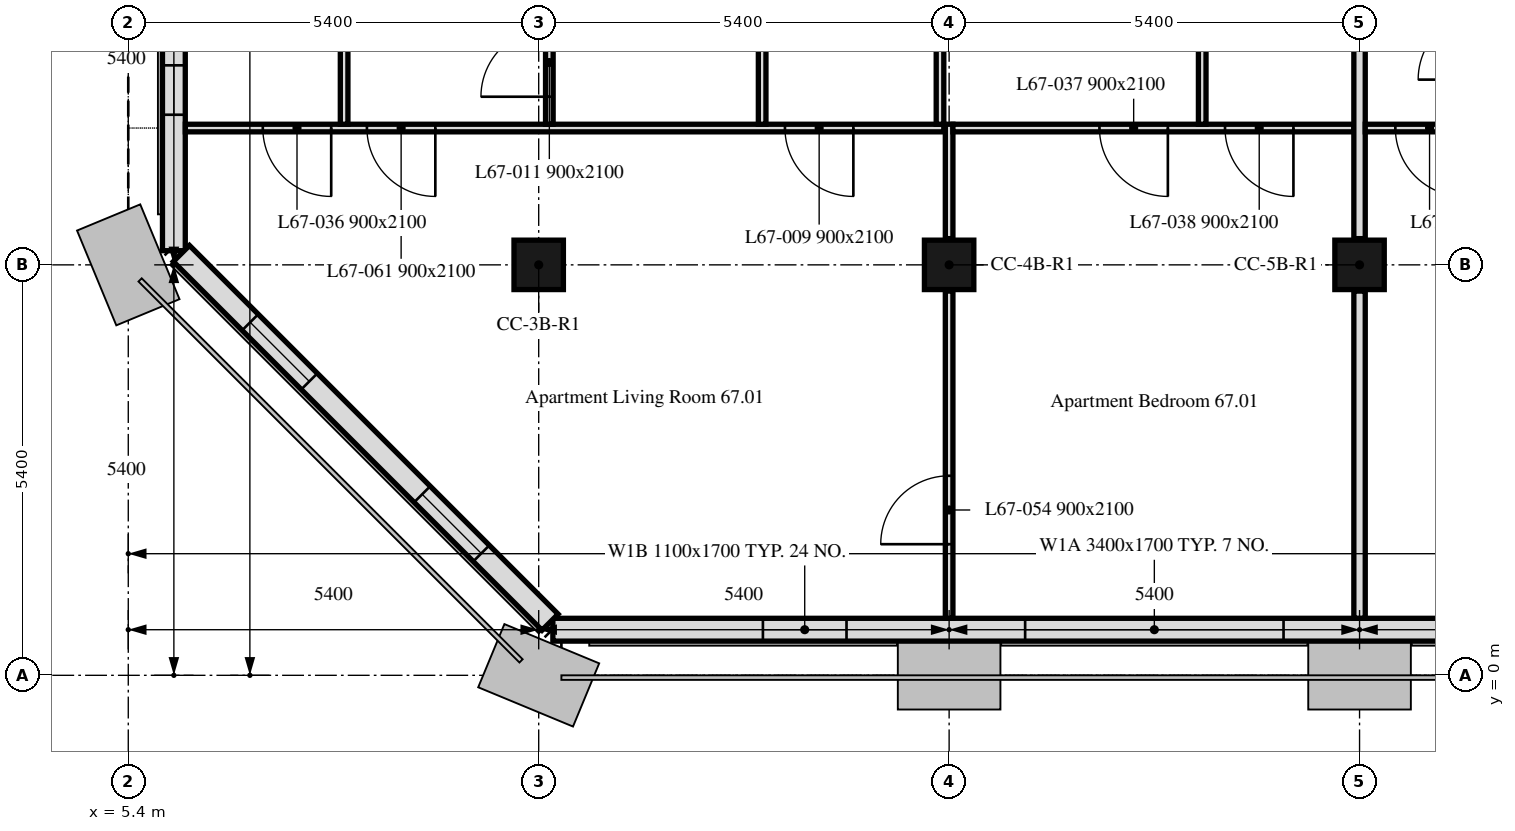
"""IFC4 building model, lengths in metres.
Left out: names, types, materials, properties, quantities, classifications, styles, units other than length and angle.
Written with IfcOpenShell. Run it as: python <this file> out.ifc"""

import sys

from ifc_helpers import new_model, si_unit, direction, frame, frame_2d, origin, origin_2d, place, context, subcontext, project, spatial, rectangle, extrude, element, fill, save


model = new_model("IFC4")
c1 = context("Model", 3, precision=1e-05, world=origin(), true_north=direction((0.0, 1.0)))
c2 = subcontext(c1, "Body", "Model", "MODEL_VIEW")
j1 = project(units=[si_unit("LENGTHUNIT", "METRE"), si_unit("PLANEANGLEUNIT", "RADIAN")], contexts=[c1])
p1 = place(None, origin())
s1 = spatial("IfcSite", under=j1, at=p1, CompositionType="ELEMENT")
p2 = place(p1, origin())
s2 = spatial("IfcBuilding", under=s1, at=p2, CompositionType="ELEMENT")
p3 = place(p2, frame((0.0, 0.0, 275.2)))
s3 = spatial("IfcBuildingStorey", under=s2, at=p3, CompositionType="ELEMENT", Elevation=275.2)
for number, where, z_axis, x_axis in (
    (1, (10.8, 5.4, 0.0), (0.0, 0.0, 1.0), (1.0, 0.0, 0.0)),
    (2, (16.2, 5.4, 0.0), (0.0, 0.0, 1.0), (1.0, 0.0, 0.0)),
    (3, (21.6, 5.4, 0.0), (0.0, 0.0, 1.0), (1.0, 0.0, 0.0)),
):
    element("IfcColumn", number, at=place(p3, frame(where, z_axis=z_axis, x_axis=x_axis)), inside=s3, PredefinedType="COLUMN", context=c2, shape_type="SweptSolid", body=[
        extrude(rectangle(XDim=0.65, YDim=0.65, at=origin_2d()), origin(), (0.0, 0.0, 1.0), 3.0),
    ])
p4 = place(p3, frame((10.986, 0.6, 0.0), z_axis=(0.0, 0.0, 1.0), x_axis=(1.0, 0.0, 0.0)))
e4 = element("IfcWall", 4, at=p4, inside=s3, PredefinedType="SOLIDWALL", context=c2, shape_type="SweptSolid", body=[
    extrude(rectangle(XDim=32.027, YDim=0.3, at=frame_2d((16.014, 0.0))), origin(), (0.0, 0.0, 1.0), 3.0),
])
p5 = place(p4, frame((2.764, 0.0, 0.9)))
e5 = element("IfcOpeningElement", 5, at=p5, cuts=e4, PredefinedType="OPENING", context=c2, shape_type="SweptSolid", body=[
    extrude(rectangle(XDim=1.1, YDim=1.7, at=frame_2d((0.55, 0.85))), frame((0.0, 0.16, 0.0), z_axis=(0.0, -1.0, 0.0), x_axis=(1.0, 0.0, 0.0)), (0.0, 0.0, 1.0), 0.32),
])
p6 = place(p4, frame((6.214, 0.0, 0.9)))
e6 = element("IfcOpeningElement", 6, at=p6, cuts=e4, PredefinedType="OPENING", context=c2, shape_type="SweptSolid", body=[
    extrude(rectangle(XDim=3.4, YDim=1.7, at=frame_2d((1.7, 0.85))), frame((0.0, 0.16, 0.0), z_axis=(0.0, -1.0, 0.0), x_axis=(1.0, 0.0, 0.0)), (0.0, 0.0, 1.0), 0.32),
])
p7 = place(p4, frame((13.564, 0.0, 0.9)))
e7 = element("IfcOpeningElement", 7, at=p7, cuts=e4, PredefinedType="OPENING", context=c2, shape_type="SweptSolid", body=[
    extrude(rectangle(XDim=1.1, YDim=1.7, at=frame_2d((0.55, 0.85))), frame((0.0, 0.16, 0.0), z_axis=(0.0, -1.0, 0.0), x_axis=(1.0, 0.0, 0.0)), (0.0, 0.0, 1.0), 0.32),
])
p8 = place(p4, frame((17.014, 0.0, 0.9)))
e8 = element("IfcOpeningElement", 8, at=p8, cuts=e4, PredefinedType="OPENING", context=c2, shape_type="SweptSolid", body=[
    extrude(rectangle(XDim=3.4, YDim=1.7, at=frame_2d((1.7, 0.85))), frame((0.0, 0.16, 0.0), z_axis=(0.0, -1.0, 0.0), x_axis=(1.0, 0.0, 0.0)), (0.0, 0.0, 1.0), 0.32),
])
p9 = place(p4, frame((24.364, 0.0, 0.9)))
e9 = element("IfcOpeningElement", 9, at=p9, cuts=e4, PredefinedType="OPENING", context=c2, shape_type="SweptSolid", body=[
    extrude(rectangle(XDim=1.1, YDim=1.7, at=frame_2d((0.55, 0.85))), frame((0.0, 0.16, 0.0), z_axis=(0.0, -1.0, 0.0), x_axis=(1.0, 0.0, 0.0)), (0.0, 0.0, 1.0), 0.32),
])
p10 = place(p4, frame((27.814, 0.0, 0.9)))
e10 = element("IfcOpeningElement", 10, at=p10, cuts=e4, PredefinedType="OPENING", context=c2, shape_type="SweptSolid", body=[
    extrude(rectangle(XDim=3.4, YDim=1.7, at=frame_2d((1.7, 0.85))), frame((0.0, 0.16, 0.0), z_axis=(0.0, -1.0, 0.0), x_axis=(1.0, 0.0, 0.0)), (0.0, 0.0, 1.0), 0.32),
])
p11 = place(p3, frame((6.0, 16.2, 0.0), z_axis=(0.0, 0.0, 1.0), x_axis=(0.0, -1.0, 0.0)))
e11 = element("IfcWall", 11, at=p11, inside=s3, PredefinedType="SOLIDWALL", context=c2, shape_type="SweptSolid", body=[
    extrude(rectangle(XDim=10.614, YDim=0.3, at=frame_2d((5.307, 0.0))), origin(), (0.0, 0.0, 1.0), 3.0),
])
p12 = place(p11, frame((1.975, 0.0, 0.9)))
e12 = element("IfcOpeningElement", 12, at=p12, cuts=e11, PredefinedType="OPENING", context=c2, shape_type="SweptSolid", body=[
    extrude(rectangle(XDim=0.65, YDim=1.7, at=frame_2d((0.325, 0.85))), frame((0.0, 0.16, 0.0), z_axis=(0.0, -1.0, 0.0), x_axis=(1.0, 0.0, 0.0)), (0.0, 0.0, 1.0), 0.32),
])
p13 = place(p11, frame((2.95, 0.0, 0.9)))
e13 = element("IfcOpeningElement", 13, at=p13, cuts=e11, PredefinedType="OPENING", context=c2, shape_type="SweptSolid", body=[
    extrude(rectangle(XDim=1.1, YDim=1.7, at=frame_2d((0.55, 0.85))), frame((0.0, 0.16, 0.0), z_axis=(0.0, -1.0, 0.0), x_axis=(1.0, 0.0, 0.0)), (0.0, 0.0, 1.0), 0.32),
])
p14 = place(p11, frame((6.75, 0.0, 0.9)))
e14 = element("IfcOpeningElement", 14, at=p14, cuts=e11, PredefinedType="OPENING", context=c2, shape_type="SweptSolid", body=[
    extrude(rectangle(XDim=1.1, YDim=1.7, at=frame_2d((0.55, 0.85))), frame((0.0, 0.16, 0.0), z_axis=(0.0, -1.0, 0.0), x_axis=(1.0, 0.0, 0.0)), (0.0, 0.0, 1.0), 0.32),
])
p15 = place(p11, frame((8.175, 0.0, 0.9)))
e15 = element("IfcOpeningElement", 15, at=p15, cuts=e11, PredefinedType="OPENING", context=c2, shape_type="SweptSolid", body=[
    extrude(rectangle(XDim=0.65, YDim=1.7, at=frame_2d((0.325, 0.85))), frame((0.0, 0.16, 0.0), z_axis=(0.0, -1.0, 0.0), x_axis=(1.0, 0.0, 0.0)), (0.0, 0.0, 1.0), 0.32),
])
p16 = place(p3, frame((6.099, 5.55, 0.0), z_axis=(0.0, 0.0, 1.0), x_axis=(0.707106781187, -0.707106781187, 0.0)))
e16 = element("IfcWall", 16, at=p16, inside=s3, PredefinedType="SOLIDWALL", context=c2, shape_type="SweptSolid", body=[
    extrude(rectangle(XDim=6.86, YDim=0.3, at=frame_2d((3.43, 0.0))), origin(), (0.0, 0.0, 1.0), 3.0),
])
p17 = place(p16, frame((1.28, 0.0, 0.9)))
e17 = element("IfcOpeningElement", 17, at=p17, cuts=e16, PredefinedType="OPENING", context=c2, shape_type="SweptSolid", body=[
    extrude(rectangle(XDim=1.1, YDim=1.7, at=frame_2d((0.55, 0.85))), frame((0.0, 0.16, 0.0), z_axis=(0.0, -1.0, 0.0), x_axis=(1.0, 0.0, 0.0)), (0.0, 0.0, 1.0), 0.32),
])
p18 = place(p16, frame((4.48, 0.0, 0.9)))
e18 = element("IfcOpeningElement", 18, at=p18, cuts=e16, PredefinedType="OPENING", context=c2, shape_type="SweptSolid", body=[
    extrude(rectangle(XDim=1.1, YDim=1.7, at=frame_2d((0.55, 0.85))), frame((0.0, 0.16, 0.0), z_axis=(0.0, -1.0, 0.0), x_axis=(1.0, 0.0, 0.0)), (0.0, 0.0, 1.0), 0.32),
])
p19 = place(p3, frame((16.2, 0.751, 0.0), z_axis=(0.0, 0.0, 1.0), x_axis=(0.0, 1.0, 0.0)))
e19 = element("IfcWall", 19, at=p19, inside=s3, PredefinedType="PARTITIONING", context=c2, shape_type="SweptSolid", body=[
    extrude(rectangle(XDim=4.304, YDim=0.1, at=frame_2d((2.152, 0.0))), origin(), (0.0, 0.0, 1.0), 2.4),
])
p20 = place(p19, frame((0.974, 0.0, 0.0)))
e20 = element("IfcOpeningElement", 20, at=p20, cuts=e19, PredefinedType="OPENING", context=c2, shape_type="SweptSolid", body=[
    extrude(rectangle(XDim=0.9, YDim=2.1, at=frame_2d((0.45, 1.05))), frame((0.0, 0.05, 0.0), z_axis=(0.0, -1.0, 0.0), x_axis=(1.0, 0.0, 0.0)), (0.0, 0.0, 1.0), 0.1),
])
p21 = place(p3, frame((16.2, 5.745, 0.0), z_axis=(0.0, 0.0, 1.0), x_axis=(0.0, 1.0, 0.0)))
e21 = element("IfcWall", 21, at=p21, inside=s3, PredefinedType="PARTITIONING", context=c2, shape_type="SweptSolid", body=[
    extrude(rectangle(XDim=1.505, YDim=0.1, at=frame_2d((0.752, 0.0))), origin(), (0.0, 0.0, 1.0), 2.4),
])
p22 = place(p3, frame((16.13, 7.2, 0.0), z_axis=(0.0, 0.0, 1.0), x_axis=(-1.0, 0.0, 0.0)))
e22 = element("IfcWall", 22, at=p22, inside=s3, PredefinedType="PARTITIONING", context=c2, shape_type="SweptSolid", body=[
    extrude(rectangle(XDim=9.979, YDim=0.1, at=frame_2d((4.99, 0.0))), origin(), (0.0, 0.0, 1.0), 3.0),
])
p23 = place(p22, frame((1.19, 0.0, 0.0)))
e23 = element("IfcOpeningElement", 23, at=p23, cuts=e22, PredefinedType="OPENING", context=c2, shape_type="SweptSolid", body=[
    extrude(rectangle(XDim=0.9, YDim=2.1, at=frame_2d((0.45, 1.05))), frame((0.0, 0.05, 0.0), z_axis=(0.0, -1.0, 0.0), x_axis=(1.0, 0.0, 0.0)), (0.0, 0.0, 1.0), 0.1),
])
p24 = place(p22, frame((8.06, 0.0, 0.0)))
e24 = element("IfcOpeningElement", 24, at=p24, cuts=e22, PredefinedType="OPENING", context=c2, shape_type="SweptSolid", body=[
    extrude(rectangle(XDim=0.9, YDim=2.1, at=frame_2d((0.45, 1.05))), frame((0.0, 0.05, 0.0), z_axis=(0.0, -1.0, 0.0), x_axis=(1.0, 0.0, 0.0)), (0.0, 0.0, 1.0), 0.1),
])
p25 = place(p22, frame((6.69, 0.0, 0.0)))
e25 = element("IfcOpeningElement", 25, at=p25, cuts=e22, PredefinedType="OPENING", context=c2, shape_type="SweptSolid", body=[
    extrude(rectangle(XDim=0.9, YDim=2.1, at=frame_2d((0.45, 1.05))), frame((0.0, 0.05, 0.0), z_axis=(0.0, -1.0, 0.0), x_axis=(1.0, 0.0, 0.0)), (0.0, 0.0, 1.0), 0.1),
])
p26 = place(p3, frame((21.6, 0.751, 0.0), z_axis=(0.0, 0.0, 1.0), x_axis=(0.0, 1.0, 0.0)))
e26 = element("IfcWall", 26, at=p26, inside=s3, PredefinedType="PARTITIONING", context=c2, shape_type="SweptSolid", body=[
    extrude(rectangle(XDim=4.304, YDim=0.15, at=frame_2d((2.152, 0.0))), origin(), (0.0, 0.0, 1.0), 2.4),
])
p27 = place(p3, frame((21.525, 7.2, 0.0), z_axis=(0.0, 0.0, 1.0), x_axis=(-1.0, 0.0, 0.0)))
e27 = element("IfcWall", 27, at=p27, inside=s3, PredefinedType="PARTITIONING", context=c2, shape_type="SweptSolid", body=[
    extrude(rectangle(XDim=5.275, YDim=0.1, at=frame_2d((2.637, 0.0))), origin(), (0.0, 0.0, 1.0), 3.0),
])
p28 = place(p27, frame((2.447, 0.0, 0.0)))
e28 = element("IfcOpeningElement", 28, at=p28, cuts=e27, PredefinedType="OPENING", context=c2, shape_type="SweptSolid", body=[
    extrude(rectangle(XDim=0.9, YDim=2.1, at=frame_2d((0.45, 1.05))), frame((0.0, 0.05, 0.0), z_axis=(0.0, -1.0, 0.0), x_axis=(1.0, 0.0, 0.0)), (0.0, 0.0, 1.0), 0.1),
])
p29 = place(p27, frame((0.795, 0.0, 0.0)))
e29 = element("IfcOpeningElement", 29, at=p29, cuts=e27, PredefinedType="OPENING", context=c2, shape_type="SweptSolid", body=[
    extrude(rectangle(XDim=0.9, YDim=2.1, at=frame_2d((0.45, 1.05))), frame((0.0, 0.05, 0.0), z_axis=(0.0, -1.0, 0.0), x_axis=(1.0, 0.0, 0.0)), (0.0, 0.0, 1.0), 0.1),
])
p30 = place(p3, frame((8.24, 7.25, 0.0), z_axis=(0.0, 0.0, 1.0), x_axis=(0.0, 1.0, 0.0)))
e30 = element("IfcWall", 30, at=p30, inside=s3, PredefinedType="PARTITIONING", context=c2, shape_type="SweptSolid", body=[
    extrude(rectangle(XDim=7.075, YDim=0.1, at=frame_2d((3.538, 0.0))), origin(), (0.0, 0.0, 1.0), 3.0),
])
p31 = place(p30, frame((5.2, 0.0, 0.0)))
e31 = element("IfcOpeningElement", 31, at=p31, cuts=e30, PredefinedType="OPENING", context=c2, shape_type="SweptSolid", body=[
    extrude(rectangle(XDim=0.9, YDim=2.1, at=frame_2d((0.45, 1.05))), frame((0.0, 0.05, 0.0), z_axis=(0.0, -1.0, 0.0), x_axis=(1.0, 0.0, 0.0)), (0.0, 0.0, 1.0), 0.1),
])
p32 = place(p30, frame((1.488, 0.0, 0.0)))
e32 = element("IfcOpeningElement", 32, at=p32, cuts=e30, PredefinedType="OPENING", context=c2, shape_type="SweptSolid", body=[
    extrude(rectangle(XDim=0.9, YDim=2.1, at=frame_2d((0.45, 1.05))), frame((0.0, 0.05, 0.0), z_axis=(0.0, -1.0, 0.0), x_axis=(1.0, 0.0, 0.0)), (0.0, 0.0, 1.0), 0.1),
])
p33 = place(p3, frame((10.94, 7.25, 0.0), z_axis=(0.0, 0.0, 1.0), x_axis=(0.0, 1.0, 0.0)))
e33 = element("IfcWall", 33, at=p33, inside=s3, PredefinedType="PARTITIONING", context=c2, shape_type="SweptSolid", body=[
    extrude(rectangle(XDim=3.205, YDim=0.1, at=frame_2d((1.603, 0.0))), origin(), (0.0, 0.0, 1.0), 3.0),
])
p34 = place(p33, frame((0.362, 0.0, 0.0)))
e34 = element("IfcOpeningElement", 34, at=p34, cuts=e33, PredefinedType="OPENING", context=c2, shape_type="SweptSolid", body=[
    extrude(rectangle(XDim=0.9, YDim=2.1, at=frame_2d((0.45, 1.05))), frame((0.0, 0.05, 0.0), z_axis=(0.0, -1.0, 0.0), x_axis=(1.0, 0.0, 0.0)), (0.0, 0.0, 1.0), 0.1),
])
p35 = place(p3, frame((13.74, 7.25, 0.0), z_axis=(0.0, 0.0, 1.0), x_axis=(0.0, 1.0, 0.0)))
e35 = element("IfcWall", 35, at=p35, inside=s3, PredefinedType="PARTITIONING", context=c2, shape_type="SweptSolid", body=[
    extrude(rectangle(XDim=7.075, YDim=0.1, at=frame_2d((3.538, 0.0))), origin(), (0.0, 0.0, 1.0), 3.0),
])
p36 = place(p3, frame((16.08, 7.25, 0.0), z_axis=(0.0, 0.0, 1.0), x_axis=(0.0, 1.0, 0.0)))
e36 = element("IfcWall", 36, at=p36, inside=s3, PredefinedType="PARTITIONING", context=c2, shape_type="SweptSolid", body=[
    extrude(rectangle(XDim=3.205, YDim=0.1, at=frame_2d((1.603, 0.0))), origin(), (0.0, 0.0, 1.0), 2.4),
])
p37 = place(p3, frame((19.53, 7.25, 0.0), z_axis=(0.0, 0.0, 1.0), x_axis=(0.0, 1.0, 0.0)))
e37 = element("IfcWall", 37, at=p37, inside=s3, PredefinedType="PARTITIONING", context=c2, shape_type="SweptSolid", body=[
    extrude(rectangle(XDim=7.075, YDim=0.1, at=frame_2d((3.538, 0.0))), origin(), (0.0, 0.0, 1.0), 3.0),
])
p38 = place(p3, frame((21.6, 5.745, 0.0), z_axis=(0.0, 0.0, 1.0), x_axis=(0.0, 1.0, 0.0)))
e38 = element("IfcWall", 38, at=p38, inside=s3, PredefinedType="PARTITIONING", context=c2, shape_type="SweptSolid", body=[
    extrude(rectangle(XDim=4.71, YDim=0.15, at=frame_2d((2.355, 0.0))), origin(), (0.0, 0.0, 1.0), 2.4),
])
p39 = place(p3, frame((26.772, 7.2, 0.0), z_axis=(0.0, 0.0, 1.0), x_axis=(-1.0, 0.0, 0.0)))
e39 = element("IfcWall", 39, at=p39, inside=s3, PredefinedType="PARTITIONING", context=c2, shape_type="SweptSolid", body=[
    extrude(rectangle(XDim=5.097, YDim=0.1, at=frame_2d((2.548, 0.0))), origin(), (0.0, 0.0, 1.0), 3.0),
])
p40 = place(p39, frame((3.801, 0.0, 0.0)))
e40 = element("IfcOpeningElement", 40, at=p40, cuts=e39, PredefinedType="OPENING", context=c2, shape_type="SweptSolid", body=[
    extrude(rectangle(XDim=0.9, YDim=2.1, at=frame_2d((0.45, 1.05))), frame((0.0, 0.05, 0.0), z_axis=(0.0, -1.0, 0.0), x_axis=(1.0, 0.0, 0.0)), (0.0, 0.0, 1.0), 0.1),
])
p41 = place(p39, frame((1.732, 0.0, 0.0)))
e41 = element("IfcOpeningElement", 41, at=p41, cuts=e39, PredefinedType="OPENING", context=c2, shape_type="SweptSolid", body=[
    extrude(rectangle(XDim=0.9, YDim=2.1, at=frame_2d((0.45, 1.05))), frame((0.0, 0.05, 0.0), z_axis=(0.0, -1.0, 0.0), x_axis=(1.0, 0.0, 0.0)), (0.0, 0.0, 1.0), 0.1),
])
p42 = place(p5, origin())
e42 = element("IfcWindow", 42, at=p42, inside=s3, PartitioningType="SINGLE_PANEL", PredefinedType="WINDOW", context=c2, shape_type="SweptSolid", body=[
    extrude(rectangle(XDim=1.1, YDim=1.7, at=frame_2d((0.55, 0.85))), frame((0.0, 0.03, 0.0), z_axis=(0.0, -1.0, 0.0), x_axis=(1.0, 0.0, 0.0)), (0.0, 0.0, 1.0), 0.06),
])
fill(e5, e42)
p43 = place(p6, origin())
e43 = element("IfcWindow", 43, at=p43, inside=s3, PartitioningType="SINGLE_PANEL", PredefinedType="WINDOW", context=c2, shape_type="SweptSolid", body=[
    extrude(rectangle(XDim=3.4, YDim=1.7, at=frame_2d((1.7, 0.85))), frame((0.0, 0.03, 0.0), z_axis=(0.0, -1.0, 0.0), x_axis=(1.0, 0.0, 0.0)), (0.0, 0.0, 1.0), 0.06),
])
fill(e6, e43)
p44 = place(p15, origin())
e44 = element("IfcWindow", 44, at=p44, inside=s3, PartitioningType="SINGLE_PANEL", PredefinedType="WINDOW", context=c2, shape_type="SweptSolid", body=[
    extrude(rectangle(XDim=0.65, YDim=1.7, at=frame_2d((0.325, 0.85))), frame((0.0, 0.03, 0.0), z_axis=(0.0, -1.0, 0.0), x_axis=(1.0, 0.0, 0.0)), (0.0, 0.0, 1.0), 0.06),
])
fill(e15, e44)
p45 = place(p17, origin())
e45 = element("IfcWindow", 45, at=p45, inside=s3, PartitioningType="SINGLE_PANEL", PredefinedType="WINDOW", context=c2, shape_type="SweptSolid", body=[
    extrude(rectangle(XDim=1.1, YDim=1.7, at=frame_2d((0.55, 0.85))), frame((0.0, 0.03, 0.0), z_axis=(0.0, -1.0, 0.0), x_axis=(1.0, 0.0, 0.0)), (0.0, 0.0, 1.0), 0.06),
])
fill(e17, e45)
p46 = place(p18, origin())
e46 = element("IfcWindow", 46, at=p46, inside=s3, PartitioningType="SINGLE_PANEL", PredefinedType="WINDOW", context=c2, shape_type="SweptSolid", body=[
    extrude(rectangle(XDim=1.1, YDim=1.7, at=frame_2d((0.55, 0.85))), frame((0.0, 0.03, 0.0), z_axis=(0.0, -1.0, 0.0), x_axis=(1.0, 0.0, 0.0)), (0.0, 0.0, 1.0), 0.06),
])
fill(e18, e46)
p47 = place(p23, origin())
e47 = element("IfcDoor", 47, at=p47, inside=s3, OperationType="SINGLE_SWING_RIGHT", PredefinedType="DOOR", context=c2, shape_type="SweptSolid", body=[
    extrude(rectangle(XDim=0.9, YDim=2.1, at=frame_2d((0.45, 1.05))), frame((0.0, 0.025, 0.0), z_axis=(0.0, -1.0, 0.0), x_axis=(1.0, 0.0, 0.0)), (0.0, 0.0, 1.0), 0.05),
])
fill(e23, e47)
p48 = place(p34, origin())
e48 = element("IfcDoor", 48, at=p48, inside=s3, OperationType="SINGLE_SWING_LEFT", PredefinedType="DOOR", context=c2, shape_type="SweptSolid", body=[
    extrude(rectangle(XDim=0.9, YDim=2.1, at=frame_2d((0.45, 1.05))), frame((0.0, 0.025, 0.0), z_axis=(0.0, -1.0, 0.0), x_axis=(1.0, 0.0, 0.0)), (0.0, 0.0, 1.0), 0.05),
])
fill(e34, e48)
p49 = place(p24, origin())
e49 = element("IfcDoor", 49, at=p49, inside=s3, OperationType="SINGLE_SWING_LEFT", PredefinedType="DOOR", context=c2, shape_type="SweptSolid", body=[
    extrude(rectangle(XDim=0.9, YDim=2.1, at=frame_2d((0.45, 1.05))), frame((0.0, 0.025, 0.0), z_axis=(0.0, -1.0, 0.0), x_axis=(1.0, 0.0, 0.0)), (0.0, 0.0, 1.0), 0.05),
])
fill(e24, e49)
p50 = place(p28, origin())
e50 = element("IfcDoor", 50, at=p50, inside=s3, OperationType="SINGLE_SWING_LEFT", PredefinedType="DOOR", context=c2, shape_type="SweptSolid", body=[
    extrude(rectangle(XDim=0.9, YDim=2.1, at=frame_2d((0.45, 1.05))), frame((0.0, 0.025, 0.0), z_axis=(0.0, -1.0, 0.0), x_axis=(1.0, 0.0, 0.0)), (0.0, 0.0, 1.0), 0.05),
])
fill(e28, e50)
p51 = place(p29, origin())
e51 = element("IfcDoor", 51, at=p51, inside=s3, OperationType="SINGLE_SWING_RIGHT", PredefinedType="DOOR", context=c2, shape_type="SweptSolid", body=[
    extrude(rectangle(XDim=0.9, YDim=2.1, at=frame_2d((0.45, 1.05))), frame((0.0, 0.025, 0.0), z_axis=(0.0, -1.0, 0.0), x_axis=(1.0, 0.0, 0.0)), (0.0, 0.0, 1.0), 0.05),
])
fill(e29, e51)
p52 = place(p40, origin())
e52 = element("IfcDoor", 52, at=p52, inside=s3, OperationType="SINGLE_SWING_LEFT", PredefinedType="DOOR", context=c2, shape_type="SweptSolid", body=[
    extrude(rectangle(XDim=0.9, YDim=2.1, at=frame_2d((0.45, 1.05))), frame((0.0, 0.025, 0.0), z_axis=(0.0, -1.0, 0.0), x_axis=(1.0, 0.0, 0.0)), (0.0, 0.0, 1.0), 0.05),
])
fill(e40, e52)
p53 = place(p20, origin())
e53 = element("IfcDoor", 53, at=p53, inside=s3, OperationType="SINGLE_SWING_RIGHT", PredefinedType="DOOR", context=c2, shape_type="SweptSolid", body=[
    extrude(rectangle(XDim=0.9, YDim=2.1, at=frame_2d((0.45, 1.05))), frame((0.0, 0.025, 0.0), z_axis=(0.0, -1.0, 0.0), x_axis=(1.0, 0.0, 0.0)), (0.0, 0.0, 1.0), 0.05),
])
fill(e20, e53)
p54 = place(p25, origin())
e54 = element("IfcDoor", 54, at=p54, inside=s3, OperationType="SINGLE_SWING_RIGHT", PredefinedType="DOOR", context=c2, shape_type="SweptSolid", body=[
    extrude(rectangle(XDim=0.9, YDim=2.1, at=frame_2d((0.45, 1.05))), frame((0.0, 0.025, 0.0), z_axis=(0.0, -1.0, 0.0), x_axis=(1.0, 0.0, 0.0)), (0.0, 0.0, 1.0), 0.05),
])
fill(e25, e54)
save(model, sys.argv[1])
